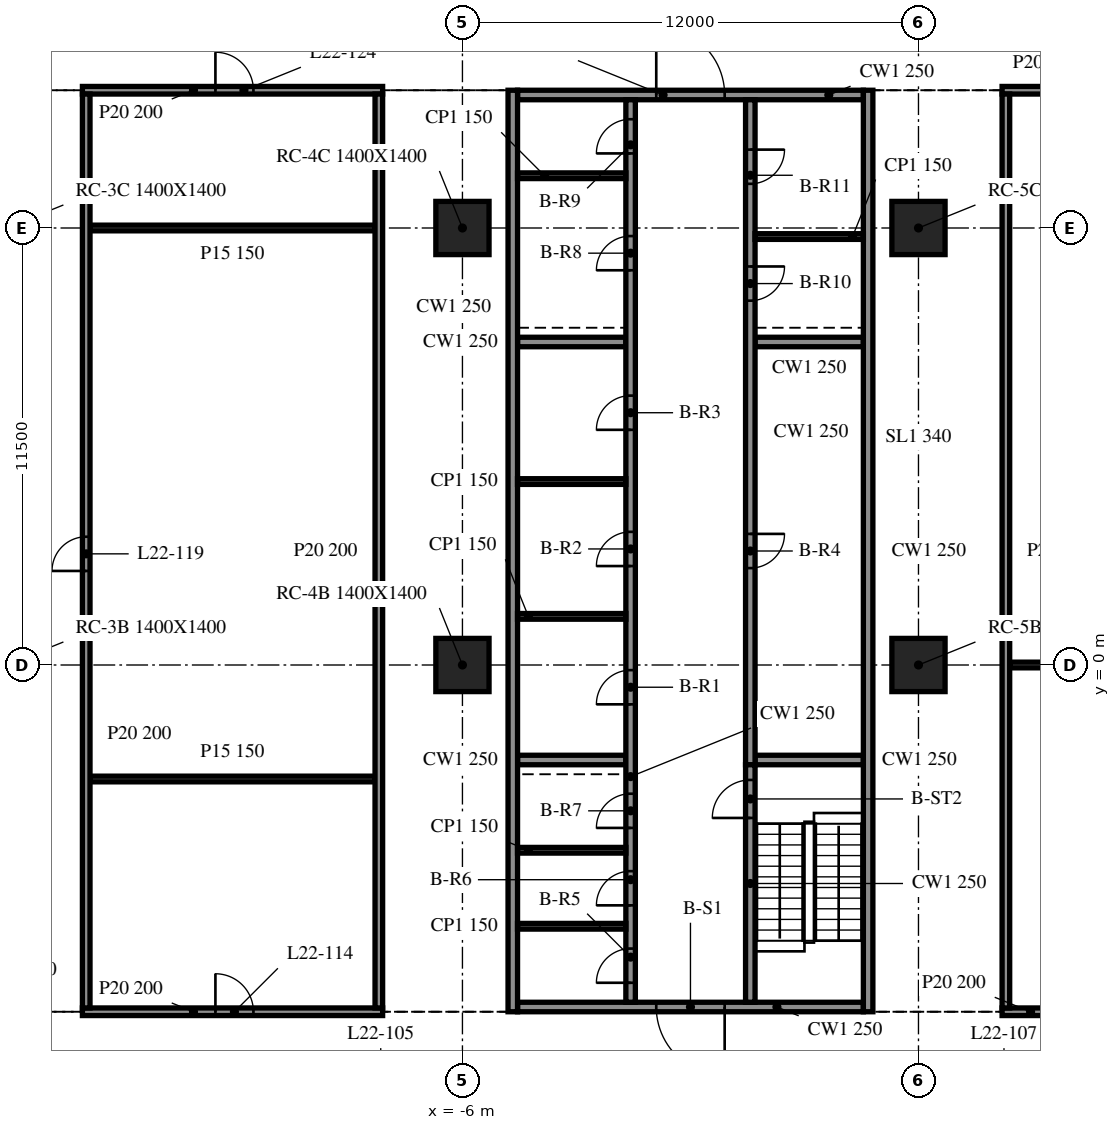
"""IFC4 building model, lengths in metres.
Left out: names, types, materials, properties, quantities, classifications, styles, units other than length and angle.
Written with IfcOpenShell. Run it as: python <this file> out.ifc"""

import sys

from ifc_helpers import new_model, si_unit, direction, frame, frame_2d, origin, origin_2d, place, context, subcontext, project, spatial, rectangle, extrude, element, fill, save


model = new_model("IFC4")
c1 = context("Model", 3, precision=1e-05, world=origin(), true_north=direction((0.0, 1.0)))
c2 = subcontext(c1, "Body", "Model", "MODEL_VIEW")
j1 = project(units=[si_unit("LENGTHUNIT", "METRE"), si_unit("PLANEANGLEUNIT", "RADIAN")], contexts=[c1])
p1 = place(None, origin())
s1 = spatial("IfcSite", under=j1, at=p1, CompositionType="ELEMENT")
p2 = place(p1, origin())
s2 = spatial("IfcBuilding", under=s1, at=p2, CompositionType="ELEMENT")
p3 = place(p2, frame((0.0, 0.0, 97.1)))
s3 = spatial("IfcBuildingStorey", under=s2, at=p3, CompositionType="ELEMENT", Elevation=97.1)
for number, where, z_axis, x_axis in (
    (1, (-6.0, 0.0, -0.34), (0.0, 0.0, 1.0), (1.0, 0.0, 0.0)),
    (2, (-6.0, 11.5, -0.34), (0.0, 0.0, 1.0), (1.0, 0.0, 0.0)),
    (3, (6.0, 0.0, -0.34), (0.0, 0.0, 1.0), (1.0, 0.0, 0.0)),
    (4, (6.0, 11.5, -0.34), (0.0, 0.0, 1.0), (1.0, 0.0, 0.0)),
):
    element("IfcColumn", number, at=place(p3, frame(where, z_axis=z_axis, x_axis=x_axis)), inside=s3, PredefinedType="COLUMN", context=c2, shape_type="SweptSolid", body=[
        extrude(rectangle(XDim=1.4, YDim=1.4, at=origin_2d()), origin(), (0.0, 0.0, 1.0), 4.1),
    ])
for number, where, z_axis, x_axis in (
    (5, (-4.675, 15.125, 0.0), (0.0, 0.0, 1.0), (0.0, -1.0, 0.0)),
    (6, (4.675, -9.125, 0.0), (0.0, 0.0, 1.0), (0.0, 1.0, 0.0)),
):
    element("IfcWall", number, at=place(p3, frame(where, z_axis=z_axis, x_axis=x_axis)), inside=s3, PredefinedType="SOLIDWALL", context=c2, shape_type="SweptSolid", body=[
        extrude(rectangle(XDim=24.25, YDim=0.25, at=frame_2d((12.125, 0.0))), origin(), (0.0, 0.0, 1.0), 3.76),
    ])
p4 = place(p3, frame((4.55, -9.0, 0.0), z_axis=(0.0, 0.0, 1.0), x_axis=(-1.0, 0.0, 0.0)))
e7 = element("IfcWall", 7, at=p4, inside=s3, PredefinedType="SOLIDWALL", context=c2, shape_type="SweptSolid", body=[
    extrude(rectangle(XDim=9.1, YDim=0.25, at=frame_2d((4.55, 0.0))), origin(), (0.0, 0.0, 1.0), 3.76),
])
p5 = place(p4, frame((3.65, 0.0, 0.0)))
e8 = element("IfcOpeningElement", 8, at=p5, cuts=e7, PredefinedType="OPENING", context=c2, shape_type="SweptSolid", body=[
    extrude(rectangle(XDim=1.8, YDim=2.1, at=frame_2d((0.9, 1.05))), frame((0.0, 0.135, 0.0), z_axis=(0.0, -1.0, 0.0), x_axis=(1.0, 0.0, 0.0)), (0.0, 0.0, 1.0), 0.27),
])
p6 = place(p3, frame((-4.55, 15.0, 0.0), z_axis=(0.0, 0.0, 1.0), x_axis=(1.0, 0.0, 0.0)))
e9 = element("IfcWall", 9, at=p6, inside=s3, PredefinedType="SOLIDWALL", context=c2, shape_type="SweptSolid", body=[
    extrude(rectangle(XDim=9.1, YDim=0.25, at=frame_2d((4.55, 0.0))), origin(), (0.0, 0.0, 1.0), 3.76),
])
p7 = place(p6, frame((3.65, 0.0, 0.0)))
e10 = element("IfcOpeningElement", 10, at=p7, cuts=e9, PredefinedType="OPENING", context=c2, shape_type="SweptSolid", body=[
    extrude(rectangle(XDim=1.8, YDim=2.1, at=frame_2d((0.9, 1.05))), frame((0.0, 0.135, 0.0), z_axis=(0.0, -1.0, 0.0), x_axis=(1.0, 0.0, 0.0)), (0.0, 0.0, 1.0), 0.27),
])
p8 = place(p3, frame((-1.575, -8.875, 0.0), z_axis=(0.0, 0.0, 1.0), x_axis=(0.0, 1.0, 0.0)))
e11 = element("IfcWall", 11, at=p8, inside=s3, PredefinedType="SOLIDWALL", context=c2, shape_type="SweptSolid", body=[
    extrude(rectangle(XDim=23.75, YDim=0.25, at=frame_2d((11.875, 0.0))), origin(), (0.0, 0.0, 1.0), 3.76),
])
p9 = place(p8, frame((7.84, 0.0, 0.0)))
e12 = element("IfcOpeningElement", 12, at=p9, cuts=e11, PredefinedType="OPENING", context=c2, shape_type="SweptSolid", body=[
    extrude(rectangle(XDim=0.9, YDim=2.1, at=frame_2d((0.45, 1.05))), frame((0.0, 0.135, 0.0), z_axis=(0.0, -1.0, 0.0), x_axis=(1.0, 0.0, 0.0)), (0.0, 0.0, 1.0), 0.27),
])
p10 = place(p8, frame((11.479, 0.0, 0.0)))
e13 = element("IfcOpeningElement", 13, at=p10, cuts=e11, PredefinedType="OPENING", context=c2, shape_type="SweptSolid", body=[
    extrude(rectangle(XDim=0.9, YDim=2.1, at=frame_2d((0.45, 1.05))), frame((0.0, 0.135, 0.0), z_axis=(0.0, -1.0, 0.0), x_axis=(1.0, 0.0, 0.0)), (0.0, 0.0, 1.0), 0.27),
])
p11 = place(p8, frame((15.064, 0.0, 0.0)))
e14 = element("IfcOpeningElement", 14, at=p11, cuts=e11, PredefinedType="OPENING", context=c2, shape_type="SweptSolid", body=[
    extrude(rectangle(XDim=0.9, YDim=2.1, at=frame_2d((0.45, 1.05))), frame((0.0, 0.135, 0.0), z_axis=(0.0, -1.0, 0.0), x_axis=(1.0, 0.0, 0.0)), (0.0, 0.0, 1.0), 0.27),
])
p12 = place(p8, frame((0.512, 0.0, 0.0)))
e15 = element("IfcOpeningElement", 15, at=p12, cuts=e11, PredefinedType="OPENING", context=c2, shape_type="SweptSolid", body=[
    extrude(rectangle(XDim=0.9, YDim=2.1, at=frame_2d((0.45, 1.05))), frame((0.0, 0.135, 0.0), z_axis=(0.0, -1.0, 0.0), x_axis=(1.0, 0.0, 0.0)), (0.0, 0.0, 1.0), 0.27),
])
p13 = place(p8, frame((2.55, 0.0, 0.0)))
e16 = element("IfcOpeningElement", 16, at=p13, cuts=e11, PredefinedType="OPENING", context=c2, shape_type="SweptSolid", body=[
    extrude(rectangle(XDim=0.9, YDim=2.1, at=frame_2d((0.45, 1.05))), frame((0.0, 0.135, 0.0), z_axis=(0.0, -1.0, 0.0), x_axis=(1.0, 0.0, 0.0)), (0.0, 0.0, 1.0), 0.27),
])
p14 = place(p8, frame((4.587, 0.0, 0.0)))
e17 = element("IfcOpeningElement", 17, at=p14, cuts=e11, PredefinedType="OPENING", context=c2, shape_type="SweptSolid", body=[
    extrude(rectangle(XDim=0.9, YDim=2.1, at=frame_2d((0.45, 1.05))), frame((0.0, 0.135, 0.0), z_axis=(0.0, -1.0, 0.0), x_axis=(1.0, 0.0, 0.0)), (0.0, 0.0, 1.0), 0.27),
])
p15 = place(p8, frame((19.262, 0.0, 0.0)))
e18 = element("IfcOpeningElement", 18, at=p15, cuts=e11, PredefinedType="OPENING", context=c2, shape_type="SweptSolid", body=[
    extrude(rectangle(XDim=0.9, YDim=2.1, at=frame_2d((0.45, 1.05))), frame((0.0, 0.135, 0.0), z_axis=(0.0, -1.0, 0.0), x_axis=(1.0, 0.0, 0.0)), (0.0, 0.0, 1.0), 0.27),
])
p16 = place(p8, frame((22.337, 0.0, 0.0)))
e19 = element("IfcOpeningElement", 19, at=p16, cuts=e11, PredefinedType="OPENING", context=c2, shape_type="SweptSolid", body=[
    extrude(rectangle(XDim=0.9, YDim=2.1, at=frame_2d((0.45, 1.05))), frame((0.0, 0.135, 0.0), z_axis=(0.0, -1.0, 0.0), x_axis=(1.0, 0.0, 0.0)), (0.0, 0.0, 1.0), 0.27),
])
p17 = place(p3, frame((1.575, -8.875, 0.0), z_axis=(0.0, 0.0, 1.0), x_axis=(0.0, 1.0, 0.0)))
e20 = element("IfcWall", 20, at=p17, inside=s3, PredefinedType="SOLIDWALL", context=c2, shape_type="SweptSolid", body=[
    extrude(rectangle(XDim=6.25, YDim=0.25, at=frame_2d((3.125, 0.0))), origin(), (0.0, 0.0, 1.0), 3.76),
])
p18 = place(p17, frame((4.85, 0.0, 0.0)))
e21 = element("IfcOpeningElement", 21, at=p18, cuts=e20, PredefinedType="OPENING", context=c2, shape_type="SweptSolid", body=[
    extrude(rectangle(XDim=1.0, YDim=2.1, at=frame_2d((0.5, 1.05))), frame((0.0, 0.135, 0.0), z_axis=(0.0, -1.0, 0.0), x_axis=(1.0, 0.0, 0.0)), (0.0, 0.0, 1.0), 0.27),
])
p19 = place(p3, frame((1.575, 14.875, 0.0), z_axis=(0.0, 0.0, 1.0), x_axis=(0.0, -1.0, 0.0)))
e22 = element("IfcWall", 22, at=p19, inside=s3, PredefinedType="SOLIDWALL", context=c2, shape_type="SweptSolid", body=[
    extrude(rectangle(XDim=17.5, YDim=0.25, at=frame_2d((8.75, 0.0))), origin(), (0.0, 0.0, 1.0), 3.76),
])
p20 = place(p19, frame((11.425, 0.0, 0.0)))
e23 = element("IfcOpeningElement", 23, at=p20, cuts=e22, PredefinedType="OPENING", context=c2, shape_type="SweptSolid", body=[
    extrude(rectangle(XDim=0.9, YDim=2.1, at=frame_2d((0.45, 1.05))), frame((0.0, 0.135, 0.0), z_axis=(0.0, -1.0, 0.0), x_axis=(1.0, 0.0, 0.0)), (0.0, 0.0, 1.0), 0.27),
])
p21 = place(p19, frame((4.387, 0.0, 0.0)))
e24 = element("IfcOpeningElement", 24, at=p21, cuts=e22, PredefinedType="OPENING", context=c2, shape_type="SweptSolid", body=[
    extrude(rectangle(XDim=0.9, YDim=2.1, at=frame_2d((0.45, 1.05))), frame((0.0, 0.135, 0.0), z_axis=(0.0, -1.0, 0.0), x_axis=(1.0, 0.0, 0.0)), (0.0, 0.0, 1.0), 0.27),
])
p22 = place(p19, frame((1.312, 0.0, 0.0)))
e25 = element("IfcOpeningElement", 25, at=p22, cuts=e22, PredefinedType="OPENING", context=c2, shape_type="SweptSolid", body=[
    extrude(rectangle(XDim=0.9, YDim=2.1, at=frame_2d((0.45, 1.05))), frame((0.0, 0.135, 0.0), z_axis=(0.0, -1.0, 0.0), x_axis=(1.0, 0.0, 0.0)), (0.0, 0.0, 1.0), 0.27),
])
for number, where, z_axis, x_axis in (
    (26, (-4.55, -2.5, 0.0), (0.0, 0.0, 1.0), (1.0, 0.0, 0.0)),
    (27, (-4.55, 8.5, 0.0), (0.0, 0.0, 1.0), (1.0, 0.0, 0.0)),
    (28, (1.7, -2.5, 0.0), (0.0, 0.0, 1.0), (1.0, 0.0, 0.0)),
    (29, (1.7, 8.5, 0.0), (0.0, 0.0, 1.0), (1.0, 0.0, 0.0)),
):
    element("IfcWall", number, at=place(p3, frame(where, z_axis=z_axis, x_axis=x_axis)), inside=s3, PredefinedType="SOLIDWALL", context=c2, shape_type="SweptSolid", body=[
        extrude(rectangle(XDim=2.85, YDim=0.25, at=frame_2d((1.425, 0.0))), origin(), (0.0, 0.0, 1.0), 3.76),
    ])
for number, where, z_axis, x_axis in (
    (30, (-4.55, 1.28, 0.0), (0.0, 0.0, 1.0), (1.0, 0.0, 0.0)),
    (31, (-4.55, 4.827, 0.0), (0.0, 0.0, 1.0), (1.0, 0.0, 0.0)),
    (32, (-4.55, -6.875, 0.0), (0.0, 0.0, 1.0), (1.0, 0.0, 0.0)),
    (33, (-4.55, -4.875, 0.0), (0.0, 0.0, 1.0), (1.0, 0.0, 0.0)),
    (34, (-4.55, 12.875, 0.0), (0.0, 0.0, 1.0), (1.0, 0.0, 0.0)),
    (35, (1.7, 11.275, 0.0), (0.0, 0.0, 1.0), (1.0, 0.0, 0.0)),
):
    element("IfcWall", number, at=place(p3, frame(where, z_axis=z_axis, x_axis=x_axis)), inside=s3, PredefinedType="PARTITIONING", context=c2, shape_type="SweptSolid", body=[
        extrude(rectangle(XDim=2.85, YDim=0.15, at=frame_2d((1.425, 0.0))), origin(), (0.0, 0.0, 1.0), 3.76),
    ])
p23 = place(p3, frame((-16.0, -9.125, 0.0), z_axis=(0.0, 0.0, 1.0), x_axis=(1.0, 0.0, 0.0)))
e36 = element("IfcWall", 36, at=p23, inside=s3, PredefinedType="PARTITIONING", context=c2, shape_type="SweptSolid", body=[
    extrude(rectangle(XDim=7.9, YDim=0.2, at=frame_2d((3.95, 0.0))), origin(), (0.0, 0.0, 1.0), 3.76),
])
p24 = place(p23, frame((3.5, 0.0, 0.0)))
e37 = element("IfcOpeningElement", 37, at=p24, cuts=e36, PredefinedType="OPENING", context=c2, shape_type="SweptSolid", body=[
    extrude(rectangle(XDim=1.0, YDim=2.1, at=frame_2d((0.5, 1.05))), frame((0.0, 0.11, 0.0), z_axis=(0.0, -1.0, 0.0), x_axis=(1.0, 0.0, 0.0)), (0.0, 0.0, 1.0), 0.22),
])
p25 = place(p3, frame((8.2, -9.125, 0.0), z_axis=(0.0, 0.0, 1.0), x_axis=(1.0, 0.0, 0.0)))
e38 = element("IfcWall", 38, at=p25, inside=s3, PredefinedType="PARTITIONING", context=c2, shape_type="SweptSolid", body=[
    extrude(rectangle(XDim=7.5, YDim=0.2, at=frame_2d((3.75, 0.0))), origin(), (0.0, 0.0, 1.0), 3.76),
])
p26 = place(p25, frame((3.3, 0.0, 0.0)))
e39 = element("IfcOpeningElement", 39, at=p26, cuts=e38, PredefinedType="OPENING", context=c2, shape_type="SweptSolid", body=[
    extrude(rectangle(XDim=1.0, YDim=2.1, at=frame_2d((0.5, 1.05))), frame((0.0, 0.11, 0.0), z_axis=(0.0, -1.0, 0.0), x_axis=(1.0, 0.0, 0.0)), (0.0, 0.0, 1.0), 0.22),
])
p27 = place(p3, frame((-15.8, -3.0, 0.0), z_axis=(0.0, 0.0, 1.0), x_axis=(1.0, 0.0, 0.0)))
e40 = element("IfcWall", 40, at=p27, inside=s3, PredefinedType="PARTITIONING", context=c2, shape_type="SweptSolid", body=[
    extrude(rectangle(XDim=7.5, YDim=0.15, at=frame_2d((3.75, 0.0))), origin(), (0.0, 0.0, 1.0), 3.76),
])
p28 = place(p3, frame((8.4, 0.0, 0.0), z_axis=(0.0, 0.0, 1.0), x_axis=(1.0, 0.0, 0.0)))
e41 = element("IfcWall", 41, at=p28, inside=s3, PredefinedType="PARTITIONING", context=c2, shape_type="SweptSolid", body=[
    extrude(rectangle(XDim=7.1, YDim=0.15, at=frame_2d((3.55, 0.0))), origin(), (0.0, 0.0, 1.0), 3.76),
])
p29 = place(p3, frame((-15.8, 11.5, 0.0), z_axis=(0.0, 0.0, 1.0), x_axis=(1.0, 0.0, 0.0)))
e42 = element("IfcWall", 42, at=p29, inside=s3, PredefinedType="PARTITIONING", context=c2, shape_type="SweptSolid", body=[
    extrude(rectangle(XDim=7.5, YDim=0.15, at=frame_2d((3.75, 0.0))), origin(), (0.0, 0.0, 1.0), 3.76),
])
p30 = place(p3, frame((-16.0, 15.125, 0.0), z_axis=(0.0, 0.0, 1.0), x_axis=(1.0, 0.0, 0.0)))
e43 = element("IfcWall", 43, at=p30, inside=s3, PredefinedType="PARTITIONING", context=c2, shape_type="SweptSolid", body=[
    extrude(rectangle(XDim=7.9, YDim=0.2, at=frame_2d((3.95, 0.0))), origin(), (0.0, 0.0, 1.0), 3.76),
])
p31 = place(p30, frame((3.5, 0.0, 0.0)))
e44 = element("IfcOpeningElement", 44, at=p31, cuts=e43, PredefinedType="OPENING", context=c2, shape_type="SweptSolid", body=[
    extrude(rectangle(XDim=1.0, YDim=2.1, at=frame_2d((0.5, 1.05))), frame((0.0, 0.11, 0.0), z_axis=(0.0, -1.0, 0.0), x_axis=(1.0, 0.0, 0.0)), (0.0, 0.0, 1.0), 0.22),
])
p32 = place(p3, frame((8.2, 15.125, 0.0), z_axis=(0.0, 0.0, 1.0), x_axis=(1.0, 0.0, 0.0)))
e45 = element("IfcWall", 45, at=p32, inside=s3, PredefinedType="PARTITIONING", context=c2, shape_type="SweptSolid", body=[
    extrude(rectangle(XDim=7.5, YDim=0.2, at=frame_2d((3.75, 0.0))), origin(), (0.0, 0.0, 1.0), 3.76),
])
p33 = place(p32, frame((3.3, 0.0, 0.0)))
e46 = element("IfcOpeningElement", 46, at=p33, cuts=e45, PredefinedType="OPENING", context=c2, shape_type="SweptSolid", body=[
    extrude(rectangle(XDim=0.9, YDim=2.1, at=frame_2d((0.45, 1.05))), frame((0.0, 0.11, 0.0), z_axis=(0.0, -1.0, 0.0), x_axis=(1.0, 0.0, 0.0)), (0.0, 0.0, 1.0), 0.22),
])
p34 = place(p3, frame((-15.9, -9.025, 0.0), z_axis=(0.0, 0.0, 1.0), x_axis=(0.0, 1.0, 0.0)))
e47 = element("IfcWall", 47, at=p34, inside=s3, PredefinedType="PARTITIONING", context=c2, shape_type="SweptSolid", body=[
    extrude(rectangle(XDim=24.05, YDim=0.2, at=frame_2d((12.025, 0.0))), origin(), (0.0, 0.0, 1.0), 3.76),
])
p35 = place(p34, frame((11.5, 0.0, 0.0)))
e48 = element("IfcOpeningElement", 48, at=p35, cuts=e47, PredefinedType="OPENING", context=c2, shape_type="SweptSolid", body=[
    extrude(rectangle(XDim=0.9, YDim=2.1, at=frame_2d((0.45, 1.05))), frame((0.0, 0.11, 0.0), z_axis=(0.0, -1.0, 0.0), x_axis=(1.0, 0.0, 0.0)), (0.0, 0.0, 1.0), 0.22),
])
for number, where, z_axis, x_axis in (
    (49, (-8.2, -9.025, 0.0), (0.0, 0.0, 1.0), (0.0, 1.0, 0.0)),
    (50, (8.3, -9.025, 0.0), (0.0, 0.0, 1.0), (0.0, 1.0, 0.0)),
):
    element("IfcWall", number, at=place(p3, frame(where, z_axis=z_axis, x_axis=x_axis)), inside=s3, PredefinedType="PARTITIONING", context=c2, shape_type="SweptSolid", body=[
        extrude(rectangle(XDim=24.05, YDim=0.2, at=frame_2d((12.025, 0.0))), origin(), (0.0, 0.0, 1.0), 3.76),
    ])
p36 = place(p5, origin())
e51 = element("IfcDoor", 51, at=p36, inside=s3, OperationType="DOUBLE_DOOR_SINGLE_SWING", PredefinedType="DOOR", context=c2, shape_type="SweptSolid", body=[
    extrude(rectangle(XDim=1.8, YDim=2.1, at=frame_2d((0.9, 1.05))), frame((0.0, 0.025, 0.0), z_axis=(0.0, -1.0, 0.0), x_axis=(1.0, 0.0, 0.0)), (0.0, 0.0, 1.0), 0.05),
])
fill(e8, e51)
p37 = place(p7, origin())
e52 = element("IfcDoor", 52, at=p37, inside=s3, OperationType="DOUBLE_DOOR_SINGLE_SWING", PredefinedType="DOOR", context=c2, shape_type="SweptSolid", body=[
    extrude(rectangle(XDim=1.8, YDim=2.1, at=frame_2d((0.9, 1.05))), frame((0.0, 0.025, 0.0), z_axis=(0.0, -1.0, 0.0), x_axis=(1.0, 0.0, 0.0)), (0.0, 0.0, 1.0), 0.05),
])
fill(e10, e52)
p38 = place(p9, origin())
e53 = element("IfcDoor", 53, at=p38, inside=s3, OperationType="SINGLE_SWING_LEFT", PredefinedType="DOOR", context=c2, shape_type="SweptSolid", body=[
    extrude(rectangle(XDim=0.9, YDim=2.1, at=frame_2d((0.45, 1.05))), frame((0.0, 0.025, 0.0), z_axis=(0.0, -1.0, 0.0), x_axis=(1.0, 0.0, 0.0)), (0.0, 0.0, 1.0), 0.05),
])
fill(e12, e53)
p39 = place(p10, origin())
e54 = element("IfcDoor", 54, at=p39, inside=s3, OperationType="SINGLE_SWING_RIGHT", PredefinedType="DOOR", context=c2, shape_type="SweptSolid", body=[
    extrude(rectangle(XDim=0.9, YDim=2.1, at=frame_2d((0.45, 1.05))), frame((0.0, 0.025, 0.0), z_axis=(0.0, -1.0, 0.0), x_axis=(1.0, 0.0, 0.0)), (0.0, 0.0, 1.0), 0.05),
])
fill(e13, e54)
p40 = place(p11, origin())
e55 = element("IfcDoor", 55, at=p40, inside=s3, OperationType="SINGLE_SWING_LEFT", PredefinedType="DOOR", context=c2, shape_type="SweptSolid", body=[
    extrude(rectangle(XDim=0.9, YDim=2.1, at=frame_2d((0.45, 1.05))), frame((0.0, 0.025, 0.0), z_axis=(0.0, -1.0, 0.0), x_axis=(1.0, 0.0, 0.0)), (0.0, 0.0, 1.0), 0.05),
])
fill(e14, e55)
p41 = place(p20, origin())
e56 = element("IfcDoor", 56, at=p41, inside=s3, OperationType="SINGLE_SWING_RIGHT", PredefinedType="DOOR", context=c2, shape_type="SweptSolid", body=[
    extrude(rectangle(XDim=0.9, YDim=2.1, at=frame_2d((0.45, 1.05))), frame((0.0, 0.025, 0.0), z_axis=(0.0, -1.0, 0.0), x_axis=(1.0, 0.0, 0.0)), (0.0, 0.0, 1.0), 0.05),
])
fill(e23, e56)
p42 = place(p12, origin())
e57 = element("IfcDoor", 57, at=p42, inside=s3, OperationType="SINGLE_SWING_LEFT", PredefinedType="DOOR", context=c2, shape_type="SweptSolid", body=[
    extrude(rectangle(XDim=0.9, YDim=2.1, at=frame_2d((0.45, 1.05))), frame((0.0, 0.025, 0.0), z_axis=(0.0, -1.0, 0.0), x_axis=(1.0, 0.0, 0.0)), (0.0, 0.0, 1.0), 0.05),
])
fill(e15, e57)
p43 = place(p13, origin())
e58 = element("IfcDoor", 58, at=p43, inside=s3, OperationType="SINGLE_SWING_RIGHT", PredefinedType="DOOR", context=c2, shape_type="SweptSolid", body=[
    extrude(rectangle(XDim=0.9, YDim=2.1, at=frame_2d((0.45, 1.05))), frame((0.0, 0.025, 0.0), z_axis=(0.0, -1.0, 0.0), x_axis=(1.0, 0.0, 0.0)), (0.0, 0.0, 1.0), 0.05),
])
fill(e16, e58)
p44 = place(p14, origin())
e59 = element("IfcDoor", 59, at=p44, inside=s3, OperationType="SINGLE_SWING_LEFT", PredefinedType="DOOR", context=c2, shape_type="SweptSolid", body=[
    extrude(rectangle(XDim=0.9, YDim=2.1, at=frame_2d((0.45, 1.05))), frame((0.0, 0.025, 0.0), z_axis=(0.0, -1.0, 0.0), x_axis=(1.0, 0.0, 0.0)), (0.0, 0.0, 1.0), 0.05),
])
fill(e17, e59)
p45 = place(p15, origin())
e60 = element("IfcDoor", 60, at=p45, inside=s3, OperationType="SINGLE_SWING_RIGHT", PredefinedType="DOOR", context=c2, shape_type="SweptSolid", body=[
    extrude(rectangle(XDim=0.9, YDim=2.1, at=frame_2d((0.45, 1.05))), frame((0.0, 0.025, 0.0), z_axis=(0.0, -1.0, 0.0), x_axis=(1.0, 0.0, 0.0)), (0.0, 0.0, 1.0), 0.05),
])
fill(e18, e60)
p46 = place(p16, origin())
e61 = element("IfcDoor", 61, at=p46, inside=s3, OperationType="SINGLE_SWING_LEFT", PredefinedType="DOOR", context=c2, shape_type="SweptSolid", body=[
    extrude(rectangle(XDim=0.9, YDim=2.1, at=frame_2d((0.45, 1.05))), frame((0.0, 0.025, 0.0), z_axis=(0.0, -1.0, 0.0), x_axis=(1.0, 0.0, 0.0)), (0.0, 0.0, 1.0), 0.05),
])
fill(e19, e61)
p47 = place(p21, origin())
e62 = element("IfcDoor", 62, at=p47, inside=s3, OperationType="SINGLE_SWING_RIGHT", PredefinedType="DOOR", context=c2, shape_type="SweptSolid", body=[
    extrude(rectangle(XDim=0.9, YDim=2.1, at=frame_2d((0.45, 1.05))), frame((0.0, 0.025, 0.0), z_axis=(0.0, -1.0, 0.0), x_axis=(1.0, 0.0, 0.0)), (0.0, 0.0, 1.0), 0.05),
])
fill(e24, e62)
p48 = place(p22, origin())
e63 = element("IfcDoor", 63, at=p48, inside=s3, OperationType="SINGLE_SWING_LEFT", PredefinedType="DOOR", context=c2, shape_type="SweptSolid", body=[
    extrude(rectangle(XDim=0.9, YDim=2.1, at=frame_2d((0.45, 1.05))), frame((0.0, 0.025, 0.0), z_axis=(0.0, -1.0, 0.0), x_axis=(1.0, 0.0, 0.0)), (0.0, 0.0, 1.0), 0.05),
])
fill(e25, e63)
p49 = place(p18, origin())
e64 = element("IfcDoor", 64, at=p49, inside=s3, OperationType="SINGLE_SWING_RIGHT", PredefinedType="DOOR", context=c2, shape_type="SweptSolid", body=[
    extrude(rectangle(XDim=1.0, YDim=2.1, at=frame_2d((0.5, 1.05))), frame((0.0, 0.025, 0.0), z_axis=(0.0, -1.0, 0.0), x_axis=(1.0, 0.0, 0.0)), (0.0, 0.0, 1.0), 0.05),
])
fill(e21, e64)
p50 = place(p24, origin())
e65 = element("IfcDoor", 65, at=p50, inside=s3, OperationType="SINGLE_SWING_RIGHT", PredefinedType="DOOR", context=c2, shape_type="SweptSolid", body=[
    extrude(rectangle(XDim=1.0, YDim=2.1, at=frame_2d((0.5, 1.05))), frame((0.0, 0.025, 0.0), z_axis=(0.0, -1.0, 0.0), x_axis=(1.0, 0.0, 0.0)), (0.0, 0.0, 1.0), 0.05),
])
fill(e37, e65)
p51 = place(p35, origin())
e66 = element("IfcDoor", 66, at=p51, inside=s3, OperationType="SINGLE_SWING_RIGHT", PredefinedType="DOOR", context=c2, shape_type="SweptSolid", body=[
    extrude(rectangle(XDim=0.9, YDim=2.1, at=frame_2d((0.45, 1.05))), frame((0.0, 0.025, 0.0), z_axis=(0.0, -1.0, 0.0), x_axis=(1.0, 0.0, 0.0)), (0.0, 0.0, 1.0), 0.05),
])
fill(e48, e66)
p52 = place(p31, origin())
e67 = element("IfcDoor", 67, at=p52, inside=s3, OperationType="SINGLE_SWING_LEFT", PredefinedType="DOOR", context=c2, shape_type="SweptSolid", body=[
    extrude(rectangle(XDim=1.0, YDim=2.1, at=frame_2d((0.5, 1.05))), frame((0.0, 0.025, 0.0), z_axis=(0.0, -1.0, 0.0), x_axis=(1.0, 0.0, 0.0)), (0.0, 0.0, 1.0), 0.05),
])
fill(e44, e67)
save(model, sys.argv[1])
